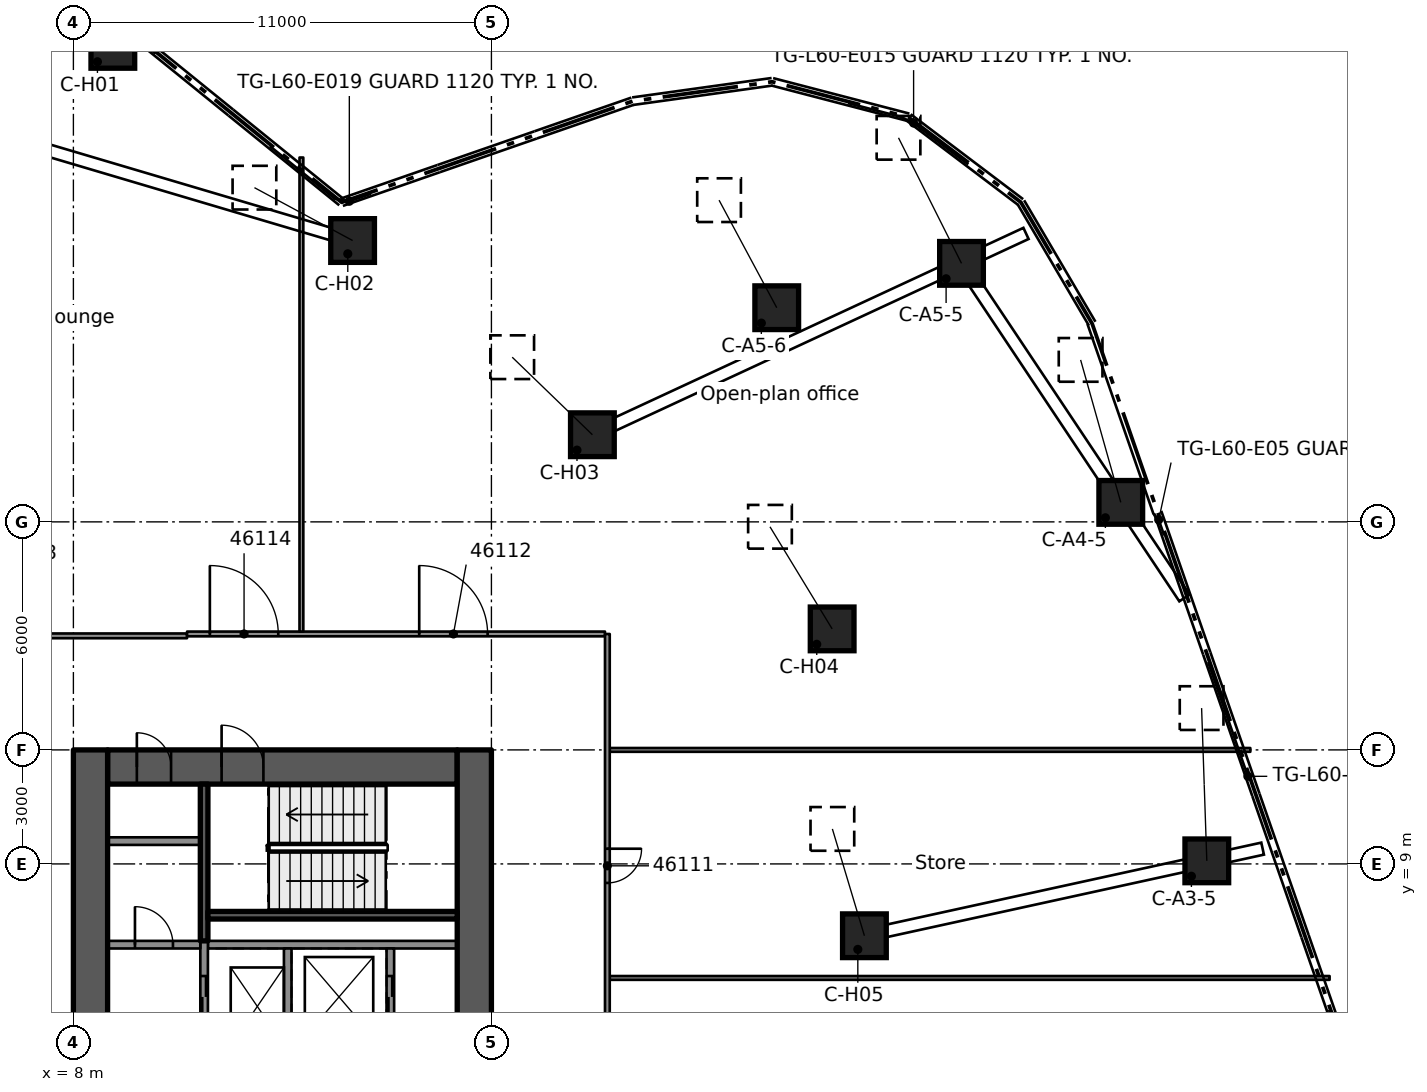
"""IFC4 building model, lengths in metres.
Left out: names, types, materials, properties, quantities, classifications, styles, units other than length and angle.
Written with IfcOpenShell. Run it as: python <this file> out.ifc"""

import sys

from ifc_helpers import new_model, si_unit, direction, frame, frame_2d, origin, origin_2d, place, context, subcontext, project, spatial, rectangle, extrude, element, fill, save


model = new_model("IFC4")
c1 = context("Model", 3, precision=1e-05, world=origin(), true_north=direction((0.0, 1.0)))
c2 = subcontext(c1, "Body", "Model", "MODEL_VIEW")
j1 = project(units=[si_unit("LENGTHUNIT", "METRE"), si_unit("PLANEANGLEUNIT", "RADIAN")], contexts=[c1])
p1 = place(None, origin())
s1 = spatial("IfcSite", under=j1, at=p1, CompositionType="ELEMENT")
p2 = place(p1, origin())
s2 = spatial("IfcBuilding", under=s1, at=p2, CompositionType="ELEMENT")
p3 = place(p2, frame((0.0, 0.0, 228.0)))
s3 = spatial("IfcBuildingStorey", under=s2, at=p3, CompositionType="ELEMENT", Elevation=228.0)
p4 = place(p3, frame((8.9, 11.55, 0.0), z_axis=(0.0, 0.0, 1.0), x_axis=(1.0, 0.0, 0.0)))
e1 = element("IfcWall", 1, at=p4, inside=s3, PredefinedType="SHEAR", context=c2, shape_type="SweptSolid", body=[
    extrude(rectangle(XDim=9.2, YDim=0.9, at=frame_2d((4.6, 0.0))), origin(), (0.0, 0.0, 1.0), 4.0),
])
p5 = place(p4, frame((3.0, 0.0, 0.0)))
e2 = element("IfcOpeningElement", 2, at=p5, cuts=e1, PredefinedType="OPENING", context=c2, shape_type="SweptSolid", body=[
    extrude(rectangle(XDim=1.1, YDim=2.1, at=frame_2d((0.55, 1.05))), frame((0.0, 0.46, 0.0), z_axis=(0.0, -1.0, 0.0), x_axis=(1.0, 0.0, 0.0)), (0.0, 0.0, 1.0), 0.92),
])
p6 = place(p4, frame((0.77, 0.0, 0.0)))
e3 = element("IfcOpeningElement", 3, at=p6, cuts=e1, PredefinedType="OPENING", context=c2, shape_type="SweptSolid", body=[
    extrude(rectangle(XDim=0.9, YDim=2.1, at=frame_2d((0.45, 1.05))), frame((0.0, 0.46, 0.0), z_axis=(0.0, -1.0, 0.0), x_axis=(1.0, 0.0, 0.0)), (0.0, 0.0, 1.0), 0.92),
])
p7 = place(p3, frame((8.45, -12.0, 0.0), z_axis=(0.0, 0.0, 1.0), x_axis=(0.0, 1.0, 0.0)))
e4 = element("IfcWall", 4, at=p7, inside=s3, PredefinedType="SHEAR", context=c2, shape_type="SweptSolid", body=[
    extrude(rectangle(XDim=24.0, YDim=0.9, at=frame_2d((12.0, 0.0))), origin(), (0.0, 0.0, 1.0), 4.0),
])
p8 = place(p7, frame((12.6, 0.0, 0.0)))
e5 = element("IfcOpeningElement", 5, at=p8, cuts=e4, PredefinedType="OPENING", context=c2, shape_type="SweptSolid", body=[
    extrude(rectangle(XDim=1.8, YDim=2.1, at=frame_2d((0.9, 1.05))), frame((0.0, 0.46, 0.0), z_axis=(0.0, -1.0, 0.0), x_axis=(1.0, 0.0, 0.0)), (0.0, 0.0, 1.0), 0.92),
])
p9 = place(p7, frame((3.25, 0.0, 0.0)))
e6 = element("IfcOpeningElement", 6, at=p9, cuts=e4, PredefinedType="OPENING", context=c2, shape_type="SweptSolid", body=[
    extrude(rectangle(XDim=1.1, YDim=2.1, at=frame_2d((0.55, 1.05))), frame((0.0, 0.46, 0.0), z_axis=(0.0, -1.0, 0.0), x_axis=(1.0, 0.0, 0.0)), (0.0, 0.0, 1.0), 0.92),
])
p10 = place(p3, frame((18.55, -12.0, 0.0), z_axis=(0.0, 0.0, 1.0), x_axis=(0.0, 1.0, 0.0)))
e7 = element("IfcWall", 7, at=p10, inside=s3, PredefinedType="SHEAR", context=c2, shape_type="SweptSolid", body=[
    extrude(rectangle(XDim=24.0, YDim=0.9, at=frame_2d((12.0, 0.0))), origin(), (0.0, 0.0, 1.0), 4.0),
])
p11 = place(p10, frame((12.1, 0.0, 0.0)))
e8 = element("IfcOpeningElement", 8, at=p11, cuts=e7, PredefinedType="OPENING", context=c2, shape_type="SweptSolid", body=[
    extrude(rectangle(XDim=1.8, YDim=2.1, at=frame_2d((0.9, 1.05))), frame((0.0, 0.46, 0.0), z_axis=(0.0, -1.0, 0.0), x_axis=(1.0, 0.0, 0.0)), (0.0, 0.0, 1.0), 0.92),
])
p12 = place(p3, frame((37.825, 9.081, 0.456), z_axis=(-0.027013518412, 0.792685454712, 0.609032051464), x_axis=(-0.999419833752, -0.034058712595, 0.0)))
e9 = element("IfcColumn", 9, at=p12, inside=s3, PredefinedType="COLUMN", context=c2, shape_type="SweptSolid", body=[
    extrude(rectangle(XDim=1.15, YDim=1.15, at=origin_2d()), origin(), (0.0, 0.0, 1.0), 5.07),
])
p13 = place(p3, frame((35.561, 18.513, 0.45), z_axis=(-0.212348084924, 0.753075563993, 0.622724245349), x_axis=(-0.962468988163, -0.271391685253, 0.0)))
e10 = element("IfcColumn", 10, at=p13, inside=s3, PredefinedType="COLUMN", context=c2, shape_type="SweptSolid", body=[
    extrude(rectangle(XDim=1.15, YDim=1.15, at=origin_2d()), origin(), (0.0, 0.0, 1.0), 4.978),
])
p14 = place(p3, frame((31.37, 24.802, 0.439), z_axis=(-0.342717857029, 0.682862302587, 0.645169393399), x_axis=(-0.893752543272, -0.448560354238, 0.0)))
e11 = element("IfcColumn", 11, at=p14, inside=s3, PredefinedType="COLUMN", context=c2, shape_type="SweptSolid", body=[
    extrude(rectangle(XDim=1.15, YDim=1.15, at=origin_2d()), origin(), (0.0, 0.0, 1.0), 4.838),
])
p15 = place(p3, frame((26.508, 23.635, 0.408), z_axis=(-0.335727016985, 0.625884139737, 0.703957678907), x_axis=(-0.881226693687, -0.47269389073, 0.0)))
e12 = element("IfcColumn", 12, at=p15, inside=s3, PredefinedType="COLUMN", context=c2, shape_type="SweptSolid", body=[
    extrude(rectangle(XDim=1.15, YDim=1.15, at=origin_2d()), origin(), (0.0, 0.0, 1.0), 4.522),
])
p16 = place(p3, frame((9.038, 30.512, 0.404), z_axis=(-0.682021270777, 0.165739556538, 0.712304278807), x_axis=(-0.236139696171, -0.971719117797, 0.0)))
e13 = element("IfcColumn", 13, at=p16, inside=s3, PredefinedType="COLUMN", context=c2, shape_type="SweptSolid", body=[
    extrude(rectangle(XDim=1.15, YDim=1.15, at=origin_2d()), origin(), (0.0, 0.0, 1.0), 4.482),
])
p17 = place(p3, frame((15.347, 25.403, 0.387), z_axis=(-0.592315342447, 0.318943337044, 0.739890318127), x_axis=(-0.474104785693, -0.880468427704, 0.0)))
e14 = element("IfcColumn", 14, at=p17, inside=s3, PredefinedType="COLUMN", context=c2, shape_type="SweptSolid", body=[
    extrude(rectangle(XDim=1.15, YDim=1.15, at=origin_2d()), origin(), (0.0, 0.0, 1.0), 4.361),
])
p18 = place(p3, frame((21.657, 20.293, 0.387), z_axis=(-0.483770630013, 0.467760632306, 0.739706677273), x_axis=(-0.695110964546, -0.718902459982, 0.0)))
e15 = element("IfcColumn", 15, at=p18, inside=s3, PredefinedType="COLUMN", context=c2, shape_type="SweptSolid", body=[
    extrude(rectangle(XDim=1.15, YDim=1.15, at=origin_2d()), origin(), (0.0, 0.0, 1.0), 4.361),
])
p19 = place(p3, frame((27.966, 15.184, 0.404), z_axis=(-0.364989084097, 0.599473191996, 0.712330583766), x_axis=(-0.854140104292, -0.520042961917, 0.0)))
e16 = element("IfcColumn", 16, at=p19, inside=s3, PredefinedType="COLUMN", context=c2, shape_type="SweptSolid", body=[
    extrude(rectangle(XDim=1.15, YDim=1.15, at=origin_2d()), origin(), (0.0, 0.0, 1.0), 4.482),
])
p20 = place(p3, frame((28.815, 7.11, 0.387), z_axis=(-0.193305987946, 0.644521239277, 0.739746691202), x_axis=(-0.957846891185, -0.287279190069, 0.0)))
e17 = element("IfcColumn", 17, at=p20, inside=s3, PredefinedType="COLUMN", context=c2, shape_type="SweptSolid", body=[
    extrude(rectangle(XDim=1.15, YDim=1.15, at=origin_2d()), origin(), (0.0, 0.0, 1.0), 4.361),
])
p21 = place(p3, frame((11.54, 6.875, 0.0), z_axis=(0.0, 0.0, 1.0), x_axis=(1.0, 0.0, 0.0)))
e18 = element("IfcWall", 18, at=p21, inside=s3, PredefinedType="SOLIDWALL", context=c2, shape_type="SweptSolid", body=[
    extrude(rectangle(XDim=6.56, YDim=0.2, at=frame_2d((3.28, 0.0))), origin(), (0.0, 0.0, 1.0), 3.59),
])
p22 = place(p3, frame((11.44, 6.975, 0.0), z_axis=(0.0, 0.0, 1.0), x_axis=(0.0, -1.0, 0.0)))
e19 = element("IfcWall", 19, at=p22, inside=s3, PredefinedType="SOLIDWALL", context=c2, shape_type="SweptSolid", body=[
    extrude(rectangle(XDim=13.95, YDim=0.2, at=frame_2d((6.975, 0.0))), origin(), (0.0, 0.0, 1.0), 3.59),
])
p23 = place(p22, frame((0.925, 0.0, 0.0)))
e20 = element("IfcOpeningElement", 20, at=p23, cuts=e19, PredefinedType="OPENING", context=c2, shape_type="SweptSolid", body=[
    extrude(rectangle(XDim=1.1, YDim=2.1, at=frame_2d((0.55, 1.05))), frame((0.0, 0.11, 0.0), z_axis=(0.0, -1.0, 0.0), x_axis=(1.0, 0.0, 0.0)), (0.0, 0.0, 1.0), 0.22),
])
p24 = place(p22, frame((3.675, 0.0, 0.0)))
e21 = element("IfcOpeningElement", 21, at=p24, cuts=e19, PredefinedType="OPENING", context=c2, shape_type="SweptSolid", body=[
    extrude(rectangle(XDim=1.1, YDim=2.1, at=frame_2d((0.55, 1.05))), frame((0.0, 0.11, 0.0), z_axis=(0.0, -1.0, 0.0), x_axis=(1.0, 0.0, 0.0)), (0.0, 0.0, 1.0), 0.22),
])
p25 = place(p22, frame((11.925, 0.0, 0.0)))
e22 = element("IfcOpeningElement", 22, at=p25, cuts=e19, PredefinedType="OPENING", context=c2, shape_type="SweptSolid", body=[
    extrude(rectangle(XDim=1.1, YDim=2.1, at=frame_2d((0.55, 1.05))), frame((0.0, 0.11, 0.0), z_axis=(0.0, -1.0, 0.0), x_axis=(1.0, 0.0, 0.0)), (0.0, 0.0, 1.0), 0.22),
])
p26 = place(p22, frame((6.575, 0.0, 0.0)))
e23 = element("IfcOpeningElement", 23, at=p26, cuts=e19, PredefinedType="OPENING", context=c2, shape_type="SweptSolid", body=[
    extrude(rectangle(XDim=0.8, YDim=2.1, at=frame_2d((0.4, 1.05))), frame((0.0, 0.11, 0.0), z_axis=(0.0, -1.0, 0.0), x_axis=(1.0, 0.0, 0.0)), (0.0, 0.0, 1.0), 0.22),
])
p27 = place(p22, frame((9.325, 0.0, 0.0)))
e24 = element("IfcOpeningElement", 24, at=p27, cuts=e19, PredefinedType="OPENING", context=c2, shape_type="SweptSolid", body=[
    extrude(rectangle(XDim=0.8, YDim=2.1, at=frame_2d((0.4, 1.05))), frame((0.0, 0.11, 0.0), z_axis=(0.0, -1.0, 0.0), x_axis=(1.0, 0.0, 0.0)), (0.0, 0.0, 1.0), 0.22),
])
p28 = place(p3, frame((13.64, 6.775, 0.0), z_axis=(0.0, 0.0, 1.0), x_axis=(0.0, -1.0, 0.0)))
e25 = element("IfcWall", 25, at=p28, inside=s3, PredefinedType="SOLIDWALL", context=c2, shape_type="SweptSolid", body=[
    extrude(rectangle(XDim=2.55, YDim=0.2, at=frame_2d((1.275, 0.0))), origin(), (0.0, 0.0, 1.0), 3.59),
])
p29 = place(p3, frame((16.34, 6.775, 0.0), z_axis=(0.0, 0.0, 1.0), x_axis=(0.0, -1.0, 0.0)))
e26 = element("IfcWall", 26, at=p29, inside=s3, PredefinedType="SOLIDWALL", context=c2, shape_type="SweptSolid", body=[
    extrude(rectangle(XDim=2.75, YDim=0.2, at=frame_2d((1.375, 0.0))), origin(), (0.0, 0.0, 1.0), 3.59),
])
p30 = place(p29, frame((0.725, 0.0, 0.0)))
e27 = element("IfcOpeningElement", 27, at=p30, cuts=e26, PredefinedType="OPENING", context=c2, shape_type="SweptSolid", body=[
    extrude(rectangle(XDim=1.1, YDim=2.1, at=frame_2d((0.55, 1.05))), frame((0.0, 0.11, 0.0), z_axis=(0.0, -1.0, 0.0), x_axis=(1.0, 0.0, 0.0)), (0.0, 0.0, 1.0), 0.22),
])
p31 = place(p3, frame((11.44, 11.1, 0.0), z_axis=(0.0, 0.0, 1.0), x_axis=(0.0, -1.0, 0.0)))
e28 = element("IfcWall", 28, at=p31, inside=s3, PredefinedType="SOLIDWALL", context=c2, shape_type="SweptSolid", body=[
    extrude(rectangle(XDim=4.125, YDim=0.2, at=frame_2d((2.062, 0.0))), origin(), (0.0, 0.0, 1.0), 3.59),
])
p32 = place(p3, frame((11.54, 7.65, 0.0), z_axis=(0.0, 0.0, 1.0), x_axis=(1.0, 0.0, 0.0)))
e29 = element("IfcWall", 29, at=p32, inside=s3, PredefinedType="SOLIDWALL", context=c2, shape_type="SweptSolid", body=[
    extrude(rectangle(XDim=6.56, YDim=0.2, at=frame_2d((3.28, 0.0))), origin(), (0.0, 0.0, 1.0), 3.59),
])
p33 = place(p3, frame((8.9, 6.875, 0.0), z_axis=(0.0, 0.0, 1.0), x_axis=(1.0, 0.0, 0.0)))
e30 = element("IfcWall", 30, at=p33, inside=s3, PredefinedType="PARTITIONING", context=c2, shape_type="SweptSolid", body=[
    extrude(rectangle(XDim=2.44, YDim=0.2, at=frame_2d((1.22, 0.0))), origin(), (0.0, 0.0, 1.0), 3.59),
])
p34 = place(p33, frame((0.72, 0.0, 0.0)))
e31 = element("IfcOpeningElement", 31, at=p34, cuts=e30, PredefinedType="OPENING", context=c2, shape_type="SweptSolid", body=[
    extrude(rectangle(XDim=1.0, YDim=2.1, at=frame_2d((0.5, 1.05))), frame((0.0, 0.11, 0.0), z_axis=(0.0, -1.0, 0.0), x_axis=(1.0, 0.0, 0.0)), (0.0, 0.0, 1.0), 0.22),
])
p35 = place(p3, frame((8.9, 9.6, 0.0), z_axis=(0.0, 0.0, 1.0), x_axis=(1.0, 0.0, 0.0)))
e32 = element("IfcWall", 32, at=p35, inside=s3, PredefinedType="PARTITIONING", context=c2, shape_type="SweptSolid", body=[
    extrude(rectangle(XDim=2.44, YDim=0.2, at=frame_2d((1.22, 0.0))), origin(), (0.0, 0.0, 1.0), 3.59),
])
p36 = place(p3, frame((22.113, 6.0, 0.0), z_axis=(0.0, 0.0, 1.0), x_axis=(1.0, 0.0, 0.0)))
e33 = element("IfcWall", 33, at=p36, inside=s3, PredefinedType="PARTITIONING", context=c2, shape_type="SweptSolid", body=[
    extrude(rectangle(XDim=18.943, YDim=0.1, at=frame_2d((9.471, 0.0))), origin(), (0.0, 0.0, 1.0), 3.58),
])
p37 = place(p3, frame((22.113, 12.0, 0.0), z_axis=(0.0, 0.0, 1.0), x_axis=(1.0, 0.0, 0.0)))
e34 = element("IfcWall", 34, at=p37, inside=s3, PredefinedType="PARTITIONING", context=c2, shape_type="SweptSolid", body=[
    extrude(rectangle(XDim=16.857, YDim=0.1, at=frame_2d((8.428, 0.0))), origin(), (0.0, 0.0, 1.0), 3.58),
])
p38 = place(p3, frame((-10.99, 15.001, 0.0), z_axis=(0.0, 0.0, 1.0), x_axis=(1.0, 0.0, 0.0)))
e35 = element("IfcWall", 35, at=p38, inside=s3, PredefinedType="PARTITIONING", context=c2, shape_type="SweptSolid", body=[
    extrude(rectangle(XDim=21.98, YDim=0.125, at=frame_2d((10.99, 0.0))), origin(), (0.0, 0.0, 1.0), 3.58),
])
p39 = place(p38, frame((15.59, 0.0, 0.0)))
e36 = element("IfcOpeningElement", 36, at=p39, cuts=e35, PredefinedType="OPENING", context=c2, shape_type="SweptSolid", body=[
    extrude(rectangle(XDim=1.8, YDim=2.1, at=frame_2d((0.9, 1.05))), frame((0.0, 0.073, 0.0), z_axis=(0.0, -1.0, 0.0), x_axis=(1.0, 0.0, 0.0)), (0.0, 0.0, 1.0), 0.145),
])
p40 = place(p38, frame((4.6, 0.0, 0.0)))
e37 = element("IfcOpeningElement", 37, at=p40, cuts=e35, PredefinedType="OPENING", context=c2, shape_type="SweptSolid", body=[
    extrude(rectangle(XDim=1.8, YDim=2.1, at=frame_2d((0.9, 1.05))), frame((0.0, 0.073, 0.0), z_axis=(0.0, -1.0, 0.0), x_axis=(1.0, 0.0, 0.0)), (0.0, 0.0, 1.0), 0.145),
])
p41 = place(p3, frame((10.991, 15.051, 0.0), z_axis=(0.0, 0.0, 1.0), x_axis=(1.0, 0.0, 0.0)))
e38 = element("IfcWall", 38, at=p41, inside=s3, PredefinedType="PARTITIONING", context=c2, shape_type="SweptSolid", body=[
    extrude(rectangle(XDim=10.997, YDim=0.125, at=frame_2d((5.499, 0.0))), origin(), (0.0, 0.0, 1.0), 3.58),
])
p42 = place(p41, frame((6.109, 0.0, 0.0)))
e39 = element("IfcOpeningElement", 39, at=p42, cuts=e38, PredefinedType="OPENING", context=c2, shape_type="SweptSolid", body=[
    extrude(rectangle(XDim=1.8, YDim=2.1, at=frame_2d((0.9, 1.05))), frame((0.0, 0.073, 0.0), z_axis=(0.0, -1.0, 0.0), x_axis=(1.0, 0.0, 0.0)), (0.0, 0.0, 1.0), 0.145),
])
p43 = place(p41, frame((0.6, 0.0, 0.0)))
e40 = element("IfcOpeningElement", 40, at=p43, cuts=e38, PredefinedType="OPENING", context=c2, shape_type="SweptSolid", body=[
    extrude(rectangle(XDim=1.8, YDim=2.1, at=frame_2d((0.9, 1.05))), frame((0.0, 0.073, 0.0), z_axis=(0.0, -1.0, 0.0), x_axis=(1.0, 0.0, 0.0)), (0.0, 0.0, 1.0), 0.145),
])
p44 = place(p3, frame((22.051, 15.05, 0.0), z_axis=(0.0, 0.0, 1.0), x_axis=(0.0, -1.0, 0.0)))
e41 = element("IfcWall", 41, at=p44, inside=s3, PredefinedType="PARTITIONING", context=c2, shape_type="SweptSolid", body=[
    extrude(rectangle(XDim=30.1, YDim=0.125, at=frame_2d((15.05, 0.0))), origin(), (0.0, 0.0, 1.0), 3.58),
])
p45 = place(p44, frame((20.15, 0.0, 0.0)))
e42 = element("IfcOpeningElement", 42, at=p45, cuts=e41, PredefinedType="OPENING", context=c2, shape_type="SweptSolid", body=[
    extrude(rectangle(XDim=1.8, YDim=2.1, at=frame_2d((0.9, 1.05))), frame((0.0, 0.073, 0.0), z_axis=(0.0, -1.0, 0.0), x_axis=(1.0, 0.0, 0.0)), (0.0, 0.0, 1.0), 0.145),
])
p46 = place(p44, frame((11.65, 0.0, 0.0)))
e43 = element("IfcOpeningElement", 43, at=p46, cuts=e41, PredefinedType="OPENING", context=c2, shape_type="SweptSolid", body=[
    extrude(rectangle(XDim=0.9, YDim=2.1, at=frame_2d((0.45, 1.05))), frame((0.0, 0.073, 0.0), z_axis=(0.0, -1.0, 0.0), x_axis=(1.0, 0.0, 0.0)), (0.0, 0.0, 1.0), 0.145),
])
p47 = place(p44, frame((5.65, 0.0, 0.0)))
e44 = element("IfcOpeningElement", 44, at=p47, cuts=e41, PredefinedType="OPENING", context=c2, shape_type="SweptSolid", body=[
    extrude(rectangle(XDim=0.9, YDim=2.1, at=frame_2d((0.45, 1.05))), frame((0.0, 0.073, 0.0), z_axis=(0.0, -1.0, 0.0), x_axis=(1.0, 0.0, 0.0)), (0.0, 0.0, 1.0), 0.145),
])
p48 = place(p3, frame((14.0, 15.114, 0.0), z_axis=(0.0, 0.0, 1.0), x_axis=(0.0, 1.0, 0.0)))
e45 = element("IfcWall", 45, at=p48, inside=s3, PredefinedType="PARTITIONING", context=c2, shape_type="SweptSolid", body=[
    extrude(rectangle(XDim=12.473, YDim=0.1, at=frame_2d((6.236, 0.0))), origin(), (0.0, 0.0, 1.0), 3.58),
])
p49 = place(p23, origin())
e46 = element("IfcDoor", 46, at=p49, inside=s3, OperationType="DOUBLE_DOOR_SLIDING", PredefinedType="DOOR", context=c2, shape_type="SweptSolid", body=[
    extrude(rectangle(XDim=1.1, YDim=2.1, at=frame_2d((0.55, 1.05))), frame((0.0, 0.025, 0.0), z_axis=(0.0, -1.0, 0.0), x_axis=(1.0, 0.0, 0.0)), (0.0, 0.0, 1.0), 0.05),
])
fill(e20, e46)
p50 = place(p30, origin())
e47 = element("IfcDoor", 47, at=p50, inside=s3, OperationType="DOUBLE_DOOR_SLIDING", PredefinedType="DOOR", context=c2, shape_type="SweptSolid", body=[
    extrude(rectangle(XDim=1.1, YDim=2.1, at=frame_2d((0.55, 1.05))), frame((0.0, 0.025, 0.0), z_axis=(0.0, -1.0, 0.0), x_axis=(1.0, 0.0, 0.0)), (0.0, 0.0, 1.0), 0.05),
])
fill(e27, e47)
p51 = place(p5, origin())
e48 = element("IfcDoor", 48, at=p51, inside=s3, OperationType="SINGLE_SWING_LEFT", PredefinedType="DOOR", context=c2, shape_type="SweptSolid", body=[
    extrude(rectangle(XDim=1.1, YDim=2.1, at=frame_2d((0.55, 1.05))), frame((0.0, 0.025, 0.0), z_axis=(0.0, -1.0, 0.0), x_axis=(1.0, 0.0, 0.0)), (0.0, 0.0, 1.0), 0.05),
])
fill(e2, e48)
p52 = place(p6, origin())
e49 = element("IfcDoor", 49, at=p52, inside=s3, OperationType="SINGLE_SWING_LEFT", PredefinedType="DOOR", context=c2, shape_type="SweptSolid", body=[
    extrude(rectangle(XDim=0.9, YDim=2.1, at=frame_2d((0.45, 1.05))), frame((0.0, 0.025, 0.0), z_axis=(0.0, -1.0, 0.0), x_axis=(1.0, 0.0, 0.0)), (0.0, 0.0, 1.0), 0.05),
])
fill(e3, e49)
p53 = place(p34, origin())
e50 = element("IfcDoor", 50, at=p53, inside=s3, OperationType="SINGLE_SWING_RIGHT", PredefinedType="DOOR", context=c2, shape_type="SweptSolid", body=[
    extrude(rectangle(XDim=1.0, YDim=2.1, at=frame_2d((0.5, 1.05))), frame((0.0, 0.025, 0.0), z_axis=(0.0, -1.0, 0.0), x_axis=(1.0, 0.0, 0.0)), (0.0, 0.0, 1.0), 0.05),
])
fill(e31, e50)
p54 = place(p47, origin())
e51 = element("IfcDoor", 51, at=p54, inside=s3, OperationType="SINGLE_SWING_LEFT", PredefinedType="DOOR", context=c2, shape_type="SweptSolid", body=[
    extrude(rectangle(XDim=0.9, YDim=2.1, at=frame_2d((0.45, 1.05))), frame((0.0, 0.025, 0.0), z_axis=(0.0, -1.0, 0.0), x_axis=(1.0, 0.0, 0.0)), (0.0, 0.0, 1.0), 0.05),
])
fill(e44, e51)
p55 = place(p42, origin())
e52 = element("IfcDoor", 52, at=p55, inside=s3, OperationType="DOUBLE_DOOR_SINGLE_SWING", PredefinedType="DOOR", context=c2, shape_type="SweptSolid", body=[
    extrude(rectangle(XDim=1.8, YDim=2.1, at=frame_2d((0.9, 1.05))), frame((0.0, 0.025, 0.0), z_axis=(0.0, -1.0, 0.0), x_axis=(1.0, 0.0, 0.0)), (0.0, 0.0, 1.0), 0.05),
])
fill(e39, e52)
p56 = place(p43, origin())
e53 = element("IfcDoor", 53, at=p56, inside=s3, OperationType="DOUBLE_DOOR_SINGLE_SWING", PredefinedType="DOOR", context=c2, shape_type="SweptSolid", body=[
    extrude(rectangle(XDim=1.8, YDim=2.1, at=frame_2d((0.9, 1.05))), frame((0.0, 0.025, 0.0), z_axis=(0.0, -1.0, 0.0), x_axis=(1.0, 0.0, 0.0)), (0.0, 0.0, 1.0), 0.05),
])
fill(e40, e53)
save(model, sys.argv[1])
